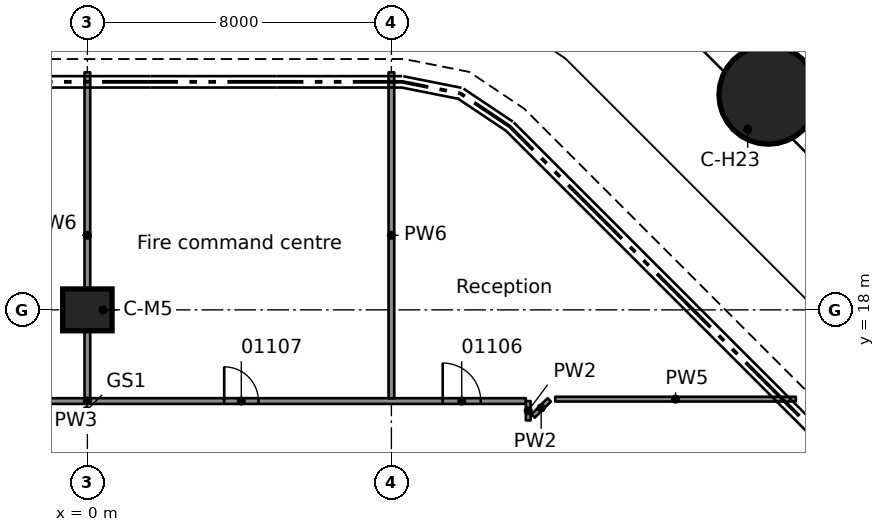
"""IFC4 building model, lengths in metres.
Left out: names, types, materials, properties, quantities, classifications, styles, units other than length and angle.
Written with IfcOpenShell. Run it as: python <this file> out.ifc"""

import sys

from ifc_helpers import new_model, si_unit, direction, frame, frame_2d, origin, origin_2d, place, context, subcontext, project, spatial, rectangle, circle, extrude, element, fill, save


model = new_model("IFC4")
c1 = context("Model", 3, precision=1e-05, world=origin(), true_north=direction((0.0, 1.0)))
c2 = subcontext(c1, "Body", "Model", "MODEL_VIEW")
j1 = project(units=[si_unit("LENGTHUNIT", "METRE"), si_unit("PLANEANGLEUNIT", "RADIAN")], contexts=[c1])
p1 = place(None, origin())
s1 = spatial("IfcSite", under=j1, at=p1, CompositionType="ELEMENT")
p2 = place(p1, origin())
s2 = spatial("IfcBuilding", under=s1, at=p2, CompositionType="ELEMENT")
p3 = place(p2, origin())
s3 = spatial("IfcBuildingStorey", under=s2, at=p3, CompositionType="ELEMENT", Elevation=0.0)
p4 = place(p3, frame((17.919, 23.659, 0.6), z_axis=(0.0, 0.0, 1.0), x_axis=(1.0, 0.0, 0.0)))
e1 = element("IfcColumn", 1, at=p4, inside=s3, PredefinedType="COLUMN", context=c2, shape_type="SweptSolid", body=[
    extrude(circle(Radius=1.3, at=origin_2d()), origin(), (0.0, 0.0, 1.0), 8.9),
])
p5 = place(p3, frame((0.0, 18.0, -0.5), z_axis=(0.0, 0.0, 1.0), x_axis=(1.0, 0.0, 0.0)))
e2 = element("IfcColumn", 2, at=p5, inside=s3, PredefinedType="COLUMN", context=c2, shape_type="SweptSolid", body=[
    extrude(rectangle(XDim=1.3, YDim=1.1, at=origin_2d()), origin(), (0.0, 0.0, 1.0), 11.0),
])
p6 = place(p3, frame((-11.537, 15.601, 0.0), z_axis=(0.0, 0.0, 1.0), x_axis=(1.0, 0.0, 0.0)))
e3 = element("IfcWall", 3, at=p6, inside=s3, PredefinedType="PARTITIONING", context=c2, shape_type="SweptSolid", body=[
    extrude(rectangle(XDim=23.074, YDim=0.15, at=frame_2d((11.537, 0.0))), origin(), (0.0, 0.0, 1.0), 10.1),
])
p7 = place(p6, frame((20.887, 0.0, 0.0)))
e4 = element("IfcOpeningElement", 4, at=p7, cuts=e3, PredefinedType="OPENING", context=c2, shape_type="SweptSolid", body=[
    extrude(rectangle(XDim=1.0, YDim=2.1, at=frame_2d((0.5, 1.05))), frame((0.0, 0.085, 0.0), z_axis=(0.0, -1.0, 0.0), x_axis=(1.0, 0.0, 0.0)), (0.0, 0.0, 1.0), 0.17),
])
p8 = place(p6, frame((15.137, 0.0, 0.0)))
e5 = element("IfcOpeningElement", 5, at=p8, cuts=e3, PredefinedType="OPENING", context=c2, shape_type="SweptSolid", body=[
    extrude(rectangle(XDim=0.9, YDim=2.1, at=frame_2d((0.45, 1.05))), frame((0.0, 0.085, 0.0), z_axis=(0.0, -1.0, 0.0), x_axis=(1.0, 0.0, 0.0)), (0.0, 0.0, 1.0), 0.17),
])
p9 = place(p6, frame((7.137, 0.0, 0.0)))
e6 = element("IfcOpeningElement", 6, at=p9, cuts=e3, PredefinedType="OPENING", context=c2, shape_type="SweptSolid", body=[
    extrude(rectangle(XDim=0.9, YDim=2.1, at=frame_2d((0.45, 1.05))), frame((0.0, 0.085, 0.0), z_axis=(0.0, -1.0, 0.0), x_axis=(1.0, 0.0, 0.0)), (0.0, 0.0, 1.0), 0.17),
])
p10 = place(p6, frame((1.288, 0.0, 0.0)))
e7 = element("IfcOpeningElement", 7, at=p10, cuts=e3, PredefinedType="OPENING", context=c2, shape_type="SweptSolid", body=[
    extrude(rectangle(XDim=0.9, YDim=2.1, at=frame_2d((0.45, 1.05))), frame((0.0, 0.085, 0.0), z_axis=(0.0, -1.0, 0.0), x_axis=(1.0, 0.0, 0.0)), (0.0, 0.0, 1.0), 0.17),
])
p11 = place(p3, frame((12.311, 15.651, 0.0), z_axis=(0.0, 0.0, 1.0), x_axis=(1.0, 0.0, 0.0)))
e8 = element("IfcWall", 8, at=p11, inside=s3, PredefinedType="PARTITIONING", context=c2, shape_type="SweptSolid", body=[
    extrude(rectangle(XDim=6.331, YDim=0.125, at=frame_2d((3.166, 0.0))), origin(), (0.0, 0.0, 1.0), 6.98),
])
p12 = place(p3, frame((11.729, 15.207, 0.0), z_axis=(0.0, 0.0, 1.0), x_axis=(0.707106781187, 0.707106781187, 0.0)))
e9 = element("IfcWall", 9, at=p12, inside=s3, PredefinedType="PARTITIONING", context=c2, shape_type="SweptSolid", body=[
    extrude(rectangle(XDim=0.6, YDim=0.125, at=frame_2d((0.3, 0.0))), origin(), (0.0, 0.0, 1.0), 10.1),
])
p13 = place(p3, frame((11.601, 15.092, 0.0), z_axis=(0.0, 0.0, 1.0), x_axis=(0.0, 1.0, 0.0)))
e10 = element("IfcWall", 10, at=p13, inside=s3, PredefinedType="PARTITIONING", context=c2, shape_type="SweptSolid", body=[
    extrude(rectangle(XDim=0.508, YDim=0.125, at=frame_2d((0.254, 0.0))), origin(), (0.0, 0.0, 1.0), 10.1),
])
for number, where, z_axis, x_axis in (
    (11, (8.0, 15.676, 0.0), (0.0, 0.0, 1.0), (0.0, 1.0, 0.0)),
    (12, (0.0, 15.676, 0.0), (0.0, 0.0, 1.0), (0.0, 1.0, 0.0)),
):
    element("IfcWall", number, at=place(p3, frame(where, z_axis=z_axis, x_axis=x_axis)), inside=s3, PredefinedType="PARTITIONING", context=c2, shape_type="SweptSolid", body=[
        extrude(rectangle(XDim=8.574, YDim=0.15, at=frame_2d((4.287, 0.0))), origin(), (0.0, 0.0, 1.0), 6.98),
    ])
p14 = place(p7, origin())
e13 = element("IfcDoor", 13, at=p14, inside=s3, OperationType="SINGLE_SWING_RIGHT", PredefinedType="DOOR", context=c2, shape_type="SweptSolid", body=[
    extrude(rectangle(XDim=1.0, YDim=2.1, at=frame_2d((0.5, 1.05))), frame((0.0, 0.025, 0.0), z_axis=(0.0, -1.0, 0.0), x_axis=(1.0, 0.0, 0.0)), (0.0, 0.0, 1.0), 0.05),
])
fill(e4, e13)
p15 = place(p8, origin())
e14 = element("IfcDoor", 14, at=p15, inside=s3, OperationType="SINGLE_SWING_RIGHT", PredefinedType="DOOR", context=c2, shape_type="SweptSolid", body=[
    extrude(rectangle(XDim=0.9, YDim=2.1, at=frame_2d((0.45, 1.05))), frame((0.0, 0.025, 0.0), z_axis=(0.0, -1.0, 0.0), x_axis=(1.0, 0.0, 0.0)), (0.0, 0.0, 1.0), 0.05),
])
fill(e5, e14)
save(model, sys.argv[1])
